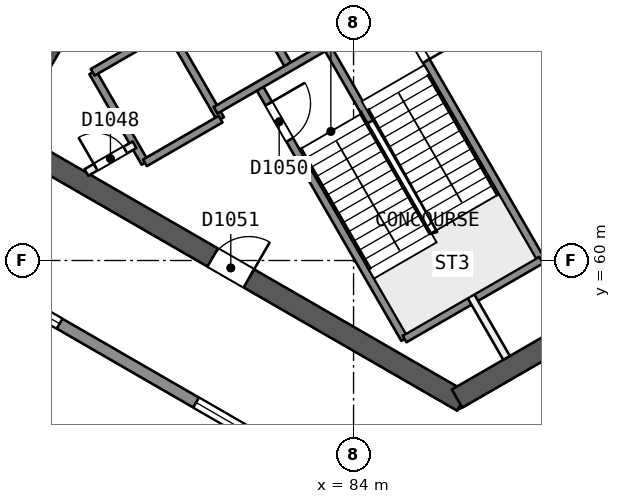
"""IFC4 building model, lengths in metres.
Left out: names, types, materials, properties, quantities, classifications, styles, units other than length and angle.
Written with IfcOpenShell. Run it as: python <this file> out.ifc"""

import sys

from ifc_helpers import new_model, si_unit, direction, frame, frame_2d, origin, place, context, subcontext, project, spatial, rectangle, extrude, element, fill, save


model = new_model("IFC4")
c1 = context("Model", 3, precision=1e-05, world=origin(), true_north=direction((0.0, 1.0)))
c2 = subcontext(c1, "Body", "Model", "MODEL_VIEW")
j1 = project(units=[si_unit("LENGTHUNIT", "METRE"), si_unit("PLANEANGLEUNIT", "RADIAN")], contexts=[c1])
p1 = place(None, origin())
s1 = spatial("IfcSite", under=j1, at=p1, CompositionType="ELEMENT")
p2 = place(p1, origin())
s2 = spatial("IfcBuilding", under=s1, at=p2, CompositionType="ELEMENT")
p3 = place(p2, frame((0.0, 0.0, 197.0)))
s3 = spatial("IfcBuildingStorey", under=s2, at=p3, CompositionType="ELEMENT", Elevation=197.0)
p4 = place(p3, frame((79.659, 71.931, 0.0), z_axis=(0.0, 0.0, 1.0), x_axis=(-0.500000202252, -0.866025287014, 0.0)))
e1 = element("IfcWall", 1, at=p4, inside=s3, PredefinedType="SHEAR", context=c2, shape_type="SweptSolid", body=[
    extrude(rectangle(XDim=10.221, YDim=0.55, at=frame_2d((5.111, 0.0))), origin(), (0.0, 0.0, 1.0), 4.4),
])
p5 = place(p4, frame((0.791, 0.0, 0.0)))
e2 = element("IfcOpeningElement", 2, at=p5, cuts=e1, PredefinedType="OPENING", context=c2, shape_type="SweptSolid", body=[
    extrude(rectangle(XDim=1.2, YDim=2.1, at=frame_2d((0.6, 1.05))), frame((0.0, 0.286, 0.0), z_axis=(0.0, -1.0, 0.0), x_axis=(1.0, 0.0, 0.0)), (0.0, 0.0, 1.0), 0.571),
])
p6 = place(p3, frame((74.686, 63.317, 0.0), z_axis=(0.0, 0.0, 1.0), x_axis=(0.866024505738, -0.500001555459, 0.0)))
e3 = element("IfcWall", 3, at=p6, inside=s3, PredefinedType="SHEAR", context=c2, shape_type="SweptSolid", body=[
    extrude(rectangle(XDim=14.059, YDim=0.55, at=frame_2d((7.029, 0.0))), origin(), (0.0, 0.0, 1.0), 4.4),
])
p7 = place(p6, frame((6.475, 0.0, 0.0)))
e4 = element("IfcOpeningElement", 4, at=p7, cuts=e3, PredefinedType="OPENING", context=c2, shape_type="SweptSolid", body=[
    extrude(rectangle(XDim=1.1, YDim=2.1, at=frame_2d((0.55, 1.05))), frame((0.0, 0.286, 0.0), z_axis=(0.0, -1.0, 0.0), x_axis=(1.0, 0.0, 0.0)), (0.0, 0.0, 1.0), 0.571),
])
p8 = place(p3, frame((86.723, 56.367, 0.0), z_axis=(0.0, 0.0, 1.0), x_axis=(0.865997833373, 0.500047750313, 0.0)))
e5 = element("IfcWall", 5, at=p8, inside=s3, PredefinedType="SHEAR", context=c2, shape_type="SweptSolid", body=[
    extrude(rectangle(XDim=3.487, YDim=0.55, at=frame_2d((1.743, 0.0))), origin(), (0.0, 0.0, 1.0), 4.4),
])
p9 = place(p3, frame((88.51, 51.267, 0.0), z_axis=(0.0, 0.0, 1.0), x_axis=(-0.866025243948, 0.500000276845, 0.0)))
e6 = element("IfcWall", 6, at=p9, inside=s3, PredefinedType="SOLIDWALL", context=c2, shape_type="SweptSolid", body=[
    extrude(rectangle(XDim=52.132, YDim=0.3, at=frame_2d((26.066, 0.0))), origin(), (0.0, 0.0, 1.0), 3.95),
])
p10 = place(p9, frame((42.139, 0.0, 0.9)))
e7 = element("IfcOpeningElement", 7, at=p10, cuts=e6, PredefinedType="OPENING", context=c2, shape_type="SweptSolid", body=[
    extrude(rectangle(XDim=1.8, YDim=1.5, at=frame_2d((0.9, 0.75))), frame((0.0, 0.161, 0.0), z_axis=(0.0, -1.0, 0.0), x_axis=(1.0, 0.0, 0.0)), (0.0, 0.0, 1.0), 0.321),
])
p11 = place(p9, frame((8.193, 0.0, 0.9)))
e8 = element("IfcOpeningElement", 8, at=p11, cuts=e6, PredefinedType="OPENING", context=c2, shape_type="SweptSolid", body=[
    extrude(rectangle(XDim=1.8, YDim=1.5, at=frame_2d((0.9, 0.75))), frame((0.0, 0.161, 0.0), z_axis=(0.0, -1.0, 0.0), x_axis=(1.0, 0.0, 0.0)), (0.0, 0.0, 1.0), 0.321),
])
p12 = place(p9, frame((3.713, 0.0, 0.6)))
e9 = element("IfcOpeningElement", 9, at=p12, cuts=e6, PredefinedType="OPENING", context=c2, shape_type="SweptSolid", body=[
    extrude(rectangle(XDim=3.0, YDim=2.4, at=frame_2d((1.5, 1.2))), frame((0.0, 0.161, 0.0), z_axis=(0.0, -1.0, 0.0), x_axis=(1.0, 0.0, 0.0)), (0.0, 0.0, 1.0), 0.321),
])
p13 = place(p9, frame((14.14, 0.0, 0.6)))
e10 = element("IfcOpeningElement", 10, at=p13, cuts=e6, PredefinedType="OPENING", context=c2, shape_type="SweptSolid", body=[
    extrude(rectangle(XDim=3.0, YDim=2.4, at=frame_2d((1.5, 1.2))), frame((0.0, 0.161, 0.0), z_axis=(0.0, -1.0, 0.0), x_axis=(1.0, 0.0, 0.0)), (0.0, 0.0, 1.0), 0.321),
])
p14 = place(p9, frame((24.566, 0.0, 0.6)))
e11 = element("IfcOpeningElement", 11, at=p14, cuts=e6, PredefinedType="OPENING", context=c2, shape_type="SweptSolid", body=[
    extrude(rectangle(XDim=3.0, YDim=2.4, at=frame_2d((1.5, 1.2))), frame((0.0, 0.161, 0.0), z_axis=(0.0, -1.0, 0.0), x_axis=(1.0, 0.0, 0.0)), (0.0, 0.0, 1.0), 0.321),
])
p15 = place(p9, frame((34.992, 0.0, 0.6)))
e12 = element("IfcOpeningElement", 12, at=p15, cuts=e6, PredefinedType="OPENING", context=c2, shape_type="SweptSolid", body=[
    extrude(rectangle(XDim=3.0, YDim=2.4, at=frame_2d((1.5, 1.2))), frame((0.0, 0.161, 0.0), z_axis=(0.0, -1.0, 0.0), x_axis=(1.0, 0.0, 0.0)), (0.0, 0.0, 1.0), 0.321),
])
p16 = place(p9, frame((45.419, 0.0, 0.6)))
e13 = element("IfcOpeningElement", 13, at=p16, cuts=e6, PredefinedType="OPENING", context=c2, shape_type="SweptSolid", body=[
    extrude(rectangle(XDim=3.0, YDim=2.4, at=frame_2d((1.5, 1.2))), frame((0.0, 0.161, 0.0), z_axis=(0.0, -1.0, 0.0), x_axis=(1.0, 0.0, 0.0)), (0.0, 0.0, 1.0), 0.321),
])
for number, where, z_axis, x_axis in (
    (14, (77.135, 64.952, 0.0), (0.0, 0.0, 1.0), (0.5, -0.866, 0.0)),
    (15, (79.127, 66.102, 0.0), (0.0, 0.0, 1.0), (0.5, -0.866, 0.0)),
):
    element("IfcWall", number, at=place(p3, frame(where, z_axis=z_axis, x_axis=x_axis)), inside=s3, PredefinedType="SOLIDWALL", context=c2, shape_type="SweptSolid", body=[
        extrude(rectangle(XDim=2.75, YDim=0.2, at=frame_2d((1.375, 0.0))), origin(), (0.0, 0.0, 1.0), 3.95),
    ])
p17 = place(p3, frame((81.493, 64.604, 0.0), z_axis=(0.0, 0.0, 1.0), x_axis=(0.500006057782, -0.866021906294, 0.0)))
e16 = element("IfcWall", 16, at=p17, inside=s3, PredefinedType="SOLIDWALL", context=c2, shape_type="SweptSolid", body=[
    extrude(rectangle(XDim=7.7, YDim=0.2, at=frame_2d((3.85, 0.0))), origin(), (0.0, 0.0, 1.0), 3.95),
])
p18 = place(p17, frame((0.55, 0.0, 0.0)))
e17 = element("IfcOpeningElement", 17, at=p18, cuts=e16, PredefinedType="OPENING", context=c2, shape_type="SweptSolid", body=[
    extrude(rectangle(XDim=1.1, YDim=2.1, at=frame_2d((0.55, 1.05))), frame((0.0, 0.11, 0.0), z_axis=(0.0, -1.0, 0.0), x_axis=(1.0, 0.0, 0.0)), (0.0, 0.0, 1.0), 0.221),
])
p19 = place(p3, frame((81.076, 67.227, 0.0), z_axis=(0.0, 0.0, 1.0), x_axis=(0.50000366821, -0.866023285932, 0.0)))
e18 = element("IfcWall", 18, at=p19, inside=s3, PredefinedType="SOLIDWALL", context=c2, shape_type="SweptSolid", body=[
    extrude(rectangle(XDim=2.48, YDim=0.2, at=frame_2d((1.24, 0.0))), origin(), (0.0, 0.0, 1.0), 3.95),
])
p20 = place(p3, frame((83.34, 65.555, 0.0), z_axis=(0.0, 0.0, 1.0), x_axis=(0.499946605688, -0.86605622881, 0.0)))
e19 = element("IfcWall", 19, at=p20, inside=s3, PredefinedType="SOLIDWALL", context=c2, shape_type="SweptSolid", body=[
    extrude(rectangle(XDim=2.2, YDim=0.2, at=frame_2d((1.1, 0.0))), origin(), (0.0, 0.0, 1.0), 3.95),
])
p21 = place(p3, frame((87.09, 59.06, 0.0), z_axis=(0.0, 0.0, 1.0), x_axis=(0.499951854219, -0.86605319898, 0.0)))
e20 = element("IfcWall", 20, at=p21, inside=s3, PredefinedType="PARTITIONING", context=c2, shape_type="SweptSolid", body=[
    extrude(rectangle(XDim=1.873, YDim=0.2, at=frame_2d((0.937, 0.0))), origin(), (0.0, 0.0, 1.0), 3.95),
])
p22 = place(p3, frame((85.087, 66.679, 0.0), z_axis=(0.0, 0.0, 1.0), x_axis=(0.500019787375, -0.866013979237, 0.0)))
e21 = element("IfcWall", 21, at=p22, inside=s3, PredefinedType="SOLIDWALL", context=c2, shape_type="SweptSolid", body=[
    extrude(rectangle(XDim=7.7, YDim=0.2, at=frame_2d((3.85, 0.0))), origin(), (0.0, 0.0, 1.0), 3.95),
])
p23 = place(p22, frame((0.55, 0.0, 0.0)))
e22 = element("IfcOpeningElement", 22, at=p23, cuts=e21, PredefinedType="OPENING", context=c2, shape_type="SweptSolid", body=[
    extrude(rectangle(XDim=1.1, YDim=2.1, at=frame_2d((0.55, 1.05))), frame((0.0, 0.11, 0.0), z_axis=(0.0, -1.0, 0.0), x_axis=(1.0, 0.0, 0.0)), (0.0, 0.0, 1.0), 0.221),
])
p24 = place(p3, frame((77.135, 64.952, 0.0), z_axis=(0.0, 0.0, 1.0), x_axis=(0.866031916153, 0.499988720078, 0.0)))
e23 = element("IfcWall", 23, at=p24, inside=s3, PredefinedType="SOLIDWALL", context=c2, shape_type="SweptSolid", body=[
    extrude(rectangle(XDim=11.35, YDim=0.2, at=frame_2d((5.675, 0.0))), origin(), (0.0, 0.0, 1.0), 3.95),
])
p25 = place(p3, frame((76.97, 62.316, 0.0), z_axis=(0.0, 0.0, 1.0), x_axis=(0.865982457891, 0.500074377092, 0.0)))
e24 = element("IfcWall", 24, at=p25, inside=s3, PredefinedType="PARTITIONING", context=c2, shape_type="SweptSolid", body=[
    extrude(rectangle(XDim=1.461, YDim=0.2, at=frame_2d((0.73, 0.0))), origin(), (0.0, 0.0, 1.0), 3.95),
])
p26 = place(p25, frame((0.281, 0.0, 0.0)))
e25 = element("IfcOpeningElement", 25, at=p26, cuts=e24, PredefinedType="OPENING", context=c2, shape_type="SweptSolid", body=[
    extrude(rectangle(XDim=0.9, YDim=2.1, at=frame_2d((0.45, 1.05))), frame((0.0, 0.11, 0.0), z_axis=(0.0, -1.0, 0.0), x_axis=(1.0, 0.0, 0.0)), (0.0, 0.0, 1.0), 0.221),
])
p27 = place(p3, frame((80.367, 63.954, 0.0), z_axis=(0.0, 0.0, 1.0), x_axis=(0.866026575979, 0.499997969693, 0.0)))
e26 = element("IfcWall", 26, at=p27, inside=s3, PredefinedType="SOLIDWALL", context=c2, shape_type="SweptSolid", body=[
    extrude(rectangle(XDim=6.75, YDim=0.2, at=frame_2d((3.375, 0.0))), origin(), (0.0, 0.0, 1.0), 3.95),
])
p28 = place(p3, frame((78.51, 62.57, 0.0), z_axis=(0.0, 0.0, 1.0), x_axis=(0.866053019151, 0.499952165731, 0.0)))
e27 = element("IfcWall", 27, at=p28, inside=s3, PredefinedType="SOLIDWALL", context=c2, shape_type="SweptSolid", body=[
    extrude(rectangle(XDim=2.3, YDim=0.2, at=frame_2d((1.15, 0.0))), origin(), (0.0, 0.0, 1.0), 3.95),
])
p29 = place(p3, frame((85.343, 57.935, 0.0), z_axis=(0.0, 0.0, 1.0), x_axis=(0.866004344652, 0.500036473714, 0.0)))
e28 = element("IfcWall", 28, at=p29, inside=s3, PredefinedType="SOLIDWALL", context=c2, shape_type="SweptSolid", body=[
    extrude(rectangle(XDim=4.15, YDim=0.2, at=frame_2d((2.075, 0.0))), origin(), (0.0, 0.0, 1.0), 3.95),
])
p30 = place(p11, origin())
e29 = element("IfcWindow", 29, at=p30, inside=s3, PartitioningType="SINGLE_PANEL", PredefinedType="WINDOW", context=c2, shape_type="SweptSolid", body=[
    extrude(rectangle(XDim=1.8, YDim=1.5, at=frame_2d((0.9, 0.75))), frame((0.0, 0.03, 0.0), z_axis=(0.0, -1.0, 0.0), x_axis=(1.0, 0.0, 0.0)), (0.0, 0.0, 1.0), 0.06),
])
fill(e8, e29)
p31 = place(p13, origin())
e30 = element("IfcWindow", 30, at=p31, inside=s3, PartitioningType="SINGLE_PANEL", PredefinedType="WINDOW", context=c2, shape_type="SweptSolid", body=[
    extrude(rectangle(XDim=3.0, YDim=2.4, at=frame_2d((1.5, 1.2))), frame((0.0, 0.03, 0.0), z_axis=(0.0, -1.0, 0.0), x_axis=(1.0, 0.0, 0.0)), (0.0, 0.0, 1.0), 0.06),
])
fill(e10, e30)
p32 = place(p26, origin())
e31 = element("IfcDoor", 31, at=p32, inside=s3, OperationType="SINGLE_SWING_LEFT", PredefinedType="NOTDEFINED", context=c2, shape_type="SweptSolid", body=[
    extrude(rectangle(XDim=0.9, YDim=2.1, at=frame_2d((0.45, 1.05))), frame((0.0, 0.025, 0.0), z_axis=(0.0, -1.0, 0.0), x_axis=(1.0, 0.0, 0.0)), (0.0, 0.0, 1.0), 0.05),
])
fill(e25, e31)
p33 = place(p23, origin())
e32 = element("IfcDoor", 32, at=p33, inside=s3, OperationType="SINGLE_SWING_RIGHT", PredefinedType="NOTDEFINED", context=c2, shape_type="SweptSolid", body=[
    extrude(rectangle(XDim=1.1, YDim=2.1, at=frame_2d((0.55, 1.05))), frame((0.0, 0.025, 0.0), z_axis=(0.0, -1.0, 0.0), x_axis=(1.0, 0.0, 0.0)), (0.0, 0.0, 1.0), 0.05),
])
fill(e22, e32)
p34 = place(p18, origin())
e33 = element("IfcDoor", 33, at=p34, inside=s3, OperationType="SINGLE_SWING_LEFT", PredefinedType="NOTDEFINED", context=c2, shape_type="SweptSolid", body=[
    extrude(rectangle(XDim=1.1, YDim=2.1, at=frame_2d((0.55, 1.05))), frame((0.0, 0.025, 0.0), z_axis=(0.0, -1.0, 0.0), x_axis=(1.0, 0.0, 0.0)), (0.0, 0.0, 1.0), 0.05),
])
fill(e17, e33)
p35 = place(p7, origin())
e34 = element("IfcDoor", 34, at=p35, inside=s3, OperationType="SINGLE_SWING_RIGHT", PredefinedType="NOTDEFINED", context=c2, shape_type="SweptSolid", body=[
    extrude(rectangle(XDim=1.1, YDim=2.1, at=frame_2d((0.55, 1.05))), frame((0.0, 0.025, 0.0), z_axis=(0.0, -1.0, 0.0), x_axis=(1.0, 0.0, 0.0)), (0.0, 0.0, 1.0), 0.05),
])
fill(e4, e34)
save(model, sys.argv[1])
